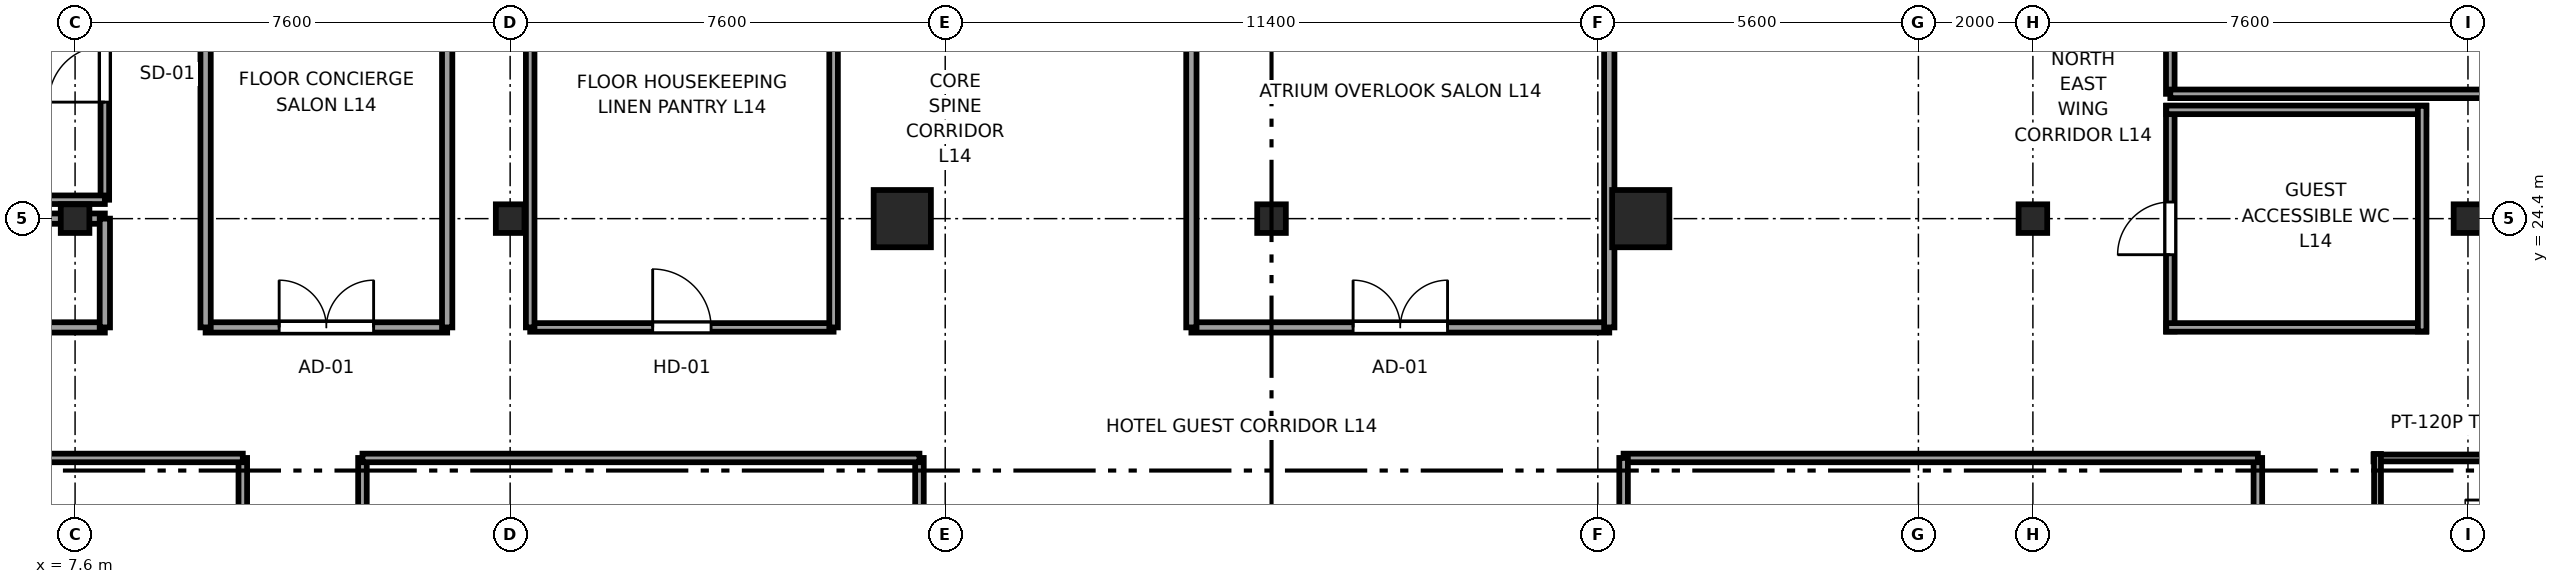
"""IFC4 building model, lengths in metres.
Left out: names, types, materials, properties, quantities, classifications, styles, units other than length and angle.
Written with IfcOpenShell. Run it as: python <this file> out.ifc"""

import sys

from ifc_helpers import new_model, si_unit, direction, frame, frame_2d, origin, origin_2d, place, context, subcontext, project, spatial, rectangle, i_section, extrude, source, transform, mapped, element, fill, save


model = new_model("IFC4")
c1 = context("Model", 3, precision=1e-05, world=origin(), true_north=direction((0.0, 1.0)))
c2 = subcontext(c1, "Body", "Model", "MODEL_VIEW")
j1 = project(units=[si_unit("LENGTHUNIT", "METRE"), si_unit("PLANEANGLEUNIT", "RADIAN")], contexts=[c1])
p1 = place(None, origin())
s1 = spatial("IfcSite", under=j1, at=p1, CompositionType="ELEMENT")
p2 = place(p1, origin())
s2 = spatial("IfcBuilding", under=s1, at=p2, CompositionType="ELEMENT")
p3 = place(p2, frame((0.0, 0.0, 60.4)))
s3 = spatial("IfcBuildingStorey", under=s2, at=p3, CompositionType="ELEMENT", Elevation=60.4)
m1 = source(origin(), c2, "Body", "SweptSolid", [
    extrude(i_section(OverallWidth=0.5, OverallDepth=0.5, WebThickness=0.028, FlangeThickness=0.045, at=origin_2d()), origin(), (0.0, 0.0, 1.0), 3.55),
])
for number, where, z_axis, x_axis in (
    (1, (7.6, 24.4, 0.0), (0.0, 0.0, 1.0), (1.0, 0.0, 0.0)),
    (2, (15.2, 24.4, 0.0), (0.0, 0.0, 1.0), (1.0, 0.0, 0.0)),
):
    element("IfcColumn", number, at=place(p3, frame(where, z_axis=z_axis, x_axis=x_axis)), inside=s3, PredefinedType="COLUMN", context=c2, shape_type="MappedRepresentation", body=[
        mapped(m1, transform((0.0, 0.0, 0.0), x_axis=(1.0, 0.0, 0.0), y_axis=(0.0, 1.0, 0.0), z_axis=(0.0, 0.0, 1.0), scale=1.0)),
    ])
m2 = source(origin(), c2, "Body", "SweptSolid", [
    extrude(rectangle(XDim=1.0, YDim=1.0, at=origin_2d()), origin(), (0.0, 0.0, 1.0), 3.55),
])
for number, where, z_axis, x_axis in (
    (3, (22.05, 24.4, 0.0), (0.0, 0.0, 1.0), (1.0, 0.0, 0.0)),
    (4, (34.95, 24.4, 0.0), (0.0, 0.0, 1.0), (1.0, 0.0, 0.0)),
):
    element("IfcColumn", number, at=place(p3, frame(where, z_axis=z_axis, x_axis=x_axis)), inside=s3, PredefinedType="COLUMN", context=c2, shape_type="MappedRepresentation", body=[
        mapped(m2, transform((0.0, 0.0, 0.0), x_axis=(1.0, 0.0, 0.0), y_axis=(0.0, 1.0, 0.0), z_axis=(0.0, 0.0, 1.0), scale=1.0)),
    ])
for number, where, z_axis, x_axis in (
    (5, (41.8, 24.4, 0.0), (0.0, 0.0, 1.0), (1.0, 0.0, 0.0)),
    (6, (49.4, 24.4, 0.0), (0.0, 0.0, 1.0), (1.0, 0.0, 0.0)),
    (7, (28.5, 24.4, 0.0), (0.0, 0.0, 1.0), (1.0, 0.0, 0.0)),
):
    element("IfcColumn", number, at=place(p3, frame(where, z_axis=z_axis, x_axis=x_axis)), inside=s3, PredefinedType="COLUMN", context=c2, shape_type="MappedRepresentation", body=[
        mapped(m1, transform((0.0, 0.0, 0.0), x_axis=(1.0, 0.0, 0.0), y_axis=(0.0, 1.0, 0.0), z_axis=(0.0, 0.0, 1.0), scale=1.0)),
    ])
p4 = place(p3, frame((47.75, 20.22, 0.0), z_axis=(0.0, 0.0, 1.0), x_axis=(1.0, 0.0, 0.0)))
e8 = element("IfcWall", 8, at=p4, inside=s3, PredefinedType="PLUMBINGWALL", context=c2, shape_type="SweptSolid", body=[
    extrude(rectangle(XDim=2.59, YDim=0.12, at=frame_2d((1.295, 0.0))), origin(), (0.0, 0.0, 1.0), 3.37),
])
p5 = place(p3, frame((47.82, 17.9, 0.0), z_axis=(0.0, 0.0, 1.0), x_axis=(0.0, 1.0, 0.0)))
e9 = element("IfcWall", 9, at=p5, inside=s3, PredefinedType="PLUMBINGWALL", context=c2, shape_type="SweptSolid", body=[
    extrude(rectangle(XDim=2.39, YDim=0.12, at=frame_2d((1.195, 0.0))), origin(), (0.0, 0.0, 1.0), 3.37),
])
p6 = place(p3, frame((10.53, 17.41, 0.0), z_axis=(0.0, 0.0, 1.0), x_axis=(0.0, 1.0, 0.0)))
e10 = element("IfcWall", 10, at=p6, inside=s3, PredefinedType="PARTITIONING", context=c2, shape_type="SweptSolid", body=[
    extrude(rectangle(XDim=2.81, YDim=0.15, at=frame_2d((1.405, 0.0))), origin(), (0.0, 0.0, 1.0), 3.37),
])
p7 = place(p6, frame((0.895, 0.0, 0.0)))
e11 = element("IfcOpeningElement", 11, at=p7, cuts=e10, PredefinedType="OPENING", context=c2, shape_type="SweptSolid", body=[
    extrude(rectangle(XDim=0.98, YDim=2.12, at=frame_2d((0.49, 1.06))), frame((0.0, 0.085, 0.0), z_axis=(0.0, -1.0, 0.0), x_axis=(1.0, 0.0, 0.0)), (0.0, 0.0, 1.0), 0.17),
])
p8 = place(p3, frame((0.405, 20.22, 0.0), z_axis=(0.0, 0.0, 1.0), x_axis=(1.0, 0.0, 0.0)))
e12 = element("IfcWall", 12, at=p8, inside=s3, PredefinedType="PARTITIONING", context=c2, shape_type="SweptSolid", body=[
    extrude(rectangle(XDim=10.125, YDim=0.15, at=frame_2d((5.062, 0.0))), origin(), (0.0, 0.0, 1.0), 3.37),
])
p9 = place(p3, frame((12.62, 12.21, 0.0), z_axis=(0.0, 0.0, 1.0), x_axis=(0.0, 1.0, 0.0)))
e13 = element("IfcWall", 13, at=p9, inside=s3, PredefinedType="PARTITIONING", context=c2, shape_type="SweptSolid", body=[
    extrude(rectangle(XDim=8.01, YDim=0.15, at=frame_2d((4.005, 0.0))), origin(), (0.0, 0.0, 1.0), 3.37),
])
p10 = place(p9, frame((3.495, 0.0, 0.0)))
e14 = element("IfcOpeningElement", 14, at=p10, cuts=e13, PredefinedType="OPENING", context=c2, shape_type="SweptSolid", body=[
    extrude(rectangle(XDim=0.98, YDim=2.12, at=frame_2d((0.49, 1.06))), frame((0.0, 0.085, 0.0), z_axis=(0.0, -1.0, 0.0), x_axis=(1.0, 0.0, 0.0)), (0.0, 0.0, 1.0), 0.17),
])
p11 = place(p3, frame((22.35, 9.88, 0.0), z_axis=(0.0, 0.0, 1.0), x_axis=(0.0, 1.0, 0.0)))
e15 = element("IfcWall", 15, at=p11, inside=s3, PredefinedType="PARTITIONING", context=c2, shape_type="SweptSolid", body=[
    extrude(rectangle(XDim=10.34, YDim=0.15, at=frame_2d((5.17, 0.0))), origin(), (0.0, 0.0, 1.0), 3.37),
])
p12 = place(p3, frame((12.62, 20.22, 0.0), z_axis=(0.0, 0.0, 1.0), x_axis=(1.0, 0.0, 0.0)))
e16 = element("IfcWall", 16, at=p12, inside=s3, PredefinedType="PARTITIONING", context=c2, shape_type="SweptSolid", body=[
    extrude(rectangle(XDim=9.73, YDim=0.15, at=frame_2d((4.865, 0.0))), origin(), (0.0, 0.0, 1.0), 2.954),
])
p13 = place(p3, frame((45.73, 12.61, 0.0), z_axis=(0.0, 0.0, 1.0), x_axis=(0.0, 1.0, 0.0)))
e17 = element("IfcWall", 17, at=p13, inside=s3, PredefinedType="PARTITIONING", context=c2, shape_type="SweptSolid", body=[
    extrude(rectangle(XDim=7.61, YDim=0.15, at=frame_2d((3.805, 0.0))), origin(), (0.0, 0.0, 1.0), 2.954),
])
p14 = place(p13, frame((3.295, 0.0, 0.0)))
e18 = element("IfcOpeningElement", 18, at=p14, cuts=e17, PredefinedType="OPENING", context=c2, shape_type="SweptSolid", body=[
    extrude(rectangle(XDim=0.98, YDim=2.12, at=frame_2d((0.49, 1.06))), frame((0.0, 0.085, 0.0), z_axis=(0.0, -1.0, 0.0), x_axis=(1.0, 0.0, 0.0)), (0.0, 0.0, 1.0), 0.17),
])
p15 = place(p3, frame((34.65, 20.22, 0.0), z_axis=(0.0, 0.0, 1.0), x_axis=(1.0, 0.0, 0.0)))
e19 = element("IfcWall", 19, at=p15, inside=s3, PredefinedType="PARTITIONING", context=c2, shape_type="SweptSolid", body=[
    extrude(rectangle(XDim=11.08, YDim=0.15, at=frame_2d((5.54, 0.0))), origin(), (0.0, 0.0, 1.0), 2.954),
])
p16 = place(p3, frame((34.65, 10.28, 0.0), z_axis=(0.0, 0.0, 1.0), x_axis=(0.0, 1.0, 0.0)))
e20 = element("IfcWall", 20, at=p16, inside=s3, PredefinedType="PARTITIONING", context=c2, shape_type="SweptSolid", body=[
    extrude(rectangle(XDim=9.94, YDim=0.15, at=frame_2d((4.97, 0.0))), origin(), (0.0, 0.0, 1.0), 3.37),
])
p17 = place(p3, frame((0.405, 22.5, 0.0), z_axis=(0.0, 0.0, 1.0), x_axis=(1.0, 0.0, 0.0)))
e21 = element("IfcWall", 21, at=p17, inside=s3, PredefinedType="PARTITIONING", context=c2, shape_type="SweptSolid", body=[
    extrude(rectangle(XDim=7.715, YDim=0.18, at=frame_2d((3.857, 0.0))), origin(), (0.0, 0.0, 1.0), 3.37),
])
p18 = place(p17, frame((3.032, 0.0, 0.0)))
e22 = element("IfcOpeningElement", 22, at=p18, cuts=e21, PredefinedType="OPENING", context=c2, shape_type="SweptSolid", body=[
    extrude(rectangle(XDim=1.65, YDim=2.15, at=frame_2d((0.825, 1.075))), frame((0.0, 0.1, 0.0), z_axis=(0.0, -1.0, 0.0), x_axis=(1.0, 0.0, 0.0)), (0.0, 0.0, 1.0), 0.2),
])
p19 = place(p3, frame((0.405, 24.4, 0.0), z_axis=(0.0, 0.0, 1.0), x_axis=(1.0, 0.0, 0.0)))
e23 = element("IfcWall", 23, at=p19, inside=s3, PredefinedType="PARTITIONING", context=c2, shape_type="SweptSolid", body=[
    extrude(rectangle(XDim=7.715, YDim=0.18, at=frame_2d((3.857, 0.0))), origin(), (0.0, 0.0, 1.0), 2.748),
])
p20 = place(p3, frame((8.12, 22.5, 0.0), z_axis=(0.0, 0.0, 1.0), x_axis=(0.0, 1.0, 0.0)))
e24 = element("IfcWall", 24, at=p20, inside=s3, PredefinedType="PARTITIONING", context=c2, shape_type="SweptSolid", body=[
    extrude(rectangle(XDim=1.9, YDim=0.18, at=frame_2d((0.95, 0.0))), origin(), (0.0, 0.0, 1.0), 3.37),
])
p21 = place(p3, frame((8.12, 24.73, 0.0), z_axis=(0.0, 0.0, 1.0), x_axis=(0.0, 1.0, 0.0)))
e25 = element("IfcWall", 25, at=p21, inside=s3, PredefinedType="PARTITIONING", context=c2, shape_type="SweptSolid", body=[
    extrude(rectangle(XDim=4.39, YDim=0.15, at=frame_2d((2.195, 0.0))), origin(), (0.0, 0.0, 1.0), 3.37),
])
p22 = place(p21, frame((1.705, 0.0, 0.0)))
e26 = element("IfcOpeningElement", 26, at=p22, cuts=e25, PredefinedType="OPENING", context=c2, shape_type="SweptSolid", body=[
    extrude(rectangle(XDim=0.98, YDim=2.12, at=frame_2d((0.49, 1.06))), frame((0.0, 0.085, 0.0), z_axis=(0.0, -1.0, 0.0), x_axis=(1.0, 0.0, 0.0)), (0.0, 0.0, 1.0), 0.17),
])
p23 = place(p3, frame((0.405, 24.73, 0.0), z_axis=(0.0, 0.0, 1.0), x_axis=(1.0, 0.0, 0.0)))
e27 = element("IfcWall", 27, at=p23, inside=s3, PredefinedType="PARTITIONING", context=c2, shape_type="SweptSolid", body=[
    extrude(rectangle(XDim=7.715, YDim=0.15, at=frame_2d((3.857, 0.0))), origin(), (0.0, 0.0, 1.0), 3.37),
])
p24 = place(p3, frame((44.2, 22.43, 0.0), z_axis=(0.0, 0.0, 1.0), x_axis=(0.0, 1.0, 0.0)))
e28 = element("IfcWall", 28, at=p24, inside=s3, PredefinedType="PARTITIONING", context=c2, shape_type="SweptSolid", body=[
    extrude(rectangle(XDim=3.94, YDim=0.15, at=frame_2d((1.97, 0.0))), origin(), (0.0, 0.0, 1.0), 3.37),
])
p25 = place(p24, frame((1.34, 0.0, 0.0)))
e29 = element("IfcOpeningElement", 29, at=p25, cuts=e28, PredefinedType="OPENING", context=c2, shape_type="SweptSolid", body=[
    extrude(rectangle(XDim=0.92, YDim=2.01, at=frame_2d((0.46, 1.005))), frame((0.0, 0.085, 0.0), z_axis=(0.0, -1.0, 0.0), x_axis=(1.0, 0.0, 0.0)), (0.0, 0.0, 1.0), 0.17),
])
for number, where, z_axis, x_axis in (
    (30, (44.13, 22.5, 0.0), (0.0, 0.0, 1.0), (1.0, 0.0, 0.0)),
    (31, (44.13, 26.3, 0.0), (0.0, 0.0, 1.0), (1.0, 0.0, 0.0)),
):
    element("IfcWall", number, at=place(p3, frame(where, z_axis=z_axis, x_axis=x_axis)), inside=s3, PredefinedType="PARTITIONING", context=c2, shape_type="SweptSolid", body=[
        extrude(rectangle(XDim=4.54, YDim=0.15, at=frame_2d((2.27, 0.0))), origin(), (0.0, 0.0, 1.0), 3.37),
    ])
p26 = place(p3, frame((48.6, 22.43, 0.0), z_axis=(0.0, 0.0, 1.0), x_axis=(0.0, 1.0, 0.0)))
e32 = element("IfcWall", 32, at=p26, inside=s3, PredefinedType="PARTITIONING", context=c2, shape_type="SweptSolid", body=[
    extrude(rectangle(XDim=3.94, YDim=0.15, at=frame_2d((1.97, 0.0))), origin(), (0.0, 0.0, 1.0), 3.37),
])
p27 = place(p3, frame((44.2, 26.58, 0.0), z_axis=(0.0, 0.0, 1.0), x_axis=(0.0, 1.0, 0.0)))
e33 = element("IfcWall", 33, at=p27, inside=s3, PredefinedType="PARTITIONING", context=c2, shape_type="SweptSolid", body=[
    extrude(rectangle(XDim=4.58, YDim=0.15, at=frame_2d((2.29, 0.0))), origin(), (0.0, 0.0, 1.0), 3.37),
])
p28 = place(p27, frame((1.745, 0.0, 0.0)))
e34 = element("IfcOpeningElement", 34, at=p28, cuts=e33, PredefinedType="OPENING", context=c2, shape_type="SweptSolid", body=[
    extrude(rectangle(XDim=0.98, YDim=2.12, at=frame_2d((0.49, 1.06))), frame((0.0, 0.085, 0.0), z_axis=(0.0, -1.0, 0.0), x_axis=(1.0, 0.0, 0.0)), (0.0, 0.0, 1.0), 0.17),
])
p29 = place(p3, frame((44.2, 26.58, 0.0), z_axis=(0.0, 0.0, 1.0), x_axis=(1.0, 0.0, 0.0)))
e35 = element("IfcWall", 35, at=p29, inside=s3, PredefinedType="PARTITIONING", context=c2, shape_type="SweptSolid", body=[
    extrude(rectangle(XDim=10.03, YDim=0.15, at=frame_2d((5.015, 0.0))), origin(), (0.0, 0.0, 1.0), 3.37),
])
p30 = place(p3, frame((9.88, 22.5, 0.0), z_axis=(0.0, 0.0, 1.0), x_axis=(1.0, 0.0, 0.0)))
e36 = element("IfcWall", 36, at=p30, inside=s3, PredefinedType="PARTITIONING", context=c2, shape_type="SweptSolid", body=[
    extrude(rectangle(XDim=4.22, YDim=0.18, at=frame_2d((2.11, 0.0))), origin(), (0.0, 0.0, 1.0), 3.37),
])
p31 = place(p30, frame((1.285, 0.0, 0.0)))
e37 = element("IfcOpeningElement", 37, at=p31, cuts=e36, PredefinedType="OPENING", context=c2, shape_type="SweptSolid", body=[
    extrude(rectangle(XDim=1.65, YDim=2.15, at=frame_2d((0.825, 1.075))), frame((0.0, 0.1, 0.0), z_axis=(0.0, -1.0, 0.0), x_axis=(1.0, 0.0, 0.0)), (0.0, 0.0, 1.0), 0.2),
])
for number, where, z_axis, x_axis in (
    (38, (9.88, 22.5, 0.0), (0.0, 0.0, 1.0), (0.0, 1.0, 0.0)),
    (39, (14.1, 22.5, 0.0), (0.0, 0.0, 1.0), (0.0, 1.0, 0.0)),
):
    element("IfcWall", number, at=place(p3, frame(where, z_axis=z_axis, x_axis=x_axis)), inside=s3, PredefinedType="PARTITIONING", context=c2, shape_type="SweptSolid", body=[
        extrude(rectangle(XDim=7.25, YDim=0.18, at=frame_2d((3.625, 0.0))), origin(), (0.0, 0.0, 1.0), 3.37),
    ])
p32 = place(p3, frame((27.1, 22.5, 0.0), z_axis=(0.0, 0.0, 1.0), x_axis=(1.0, 0.0, 0.0)))
e40 = element("IfcWall", 40, at=p32, inside=s3, PredefinedType="PARTITIONING", context=c2, shape_type="SweptSolid", body=[
    extrude(rectangle(XDim=7.3, YDim=0.18, at=frame_2d((3.65, 0.0))), origin(), (0.0, 0.0, 1.0), 3.37),
])
p33 = place(p32, frame((2.825, 0.0, 0.0)))
e41 = element("IfcOpeningElement", 41, at=p33, cuts=e40, PredefinedType="OPENING", context=c2, shape_type="SweptSolid", body=[
    extrude(rectangle(XDim=1.65, YDim=2.15, at=frame_2d((0.825, 1.075))), frame((0.0, 0.1, 0.0), z_axis=(0.0, -1.0, 0.0), x_axis=(1.0, 0.0, 0.0)), (0.0, 0.0, 1.0), 0.2),
])
for number, where, z_axis, x_axis in (
    (42, (27.1, 22.5, 0.0), (0.0, 0.0, 1.0), (0.0, 1.0, 0.0)),
    (43, (34.4, 22.5, 0.0), (0.0, 0.0, 1.0), (0.0, 1.0, 0.0)),
):
    element("IfcWall", number, at=place(p3, frame(where, z_axis=z_axis, x_axis=x_axis)), inside=s3, PredefinedType="PARTITIONING", context=c2, shape_type="SweptSolid", body=[
        extrude(rectangle(XDim=7.3, YDim=0.18, at=frame_2d((3.65, 0.0))), origin(), (0.0, 0.0, 1.0), 3.37),
    ])
p34 = place(p3, frame((15.55, 22.5, 0.0), z_axis=(0.0, 0.0, 1.0), x_axis=(1.0, 0.0, 0.0)))
e44 = element("IfcWall", 44, at=p34, inside=s3, PredefinedType="PARTITIONING", context=c2, shape_type="SweptSolid", body=[
    extrude(rectangle(XDim=5.3, YDim=0.15, at=frame_2d((2.65, 0.0))), origin(), (0.0, 0.0, 1.0), 3.37),
])
p35 = place(p34, frame((2.14, 0.0, 0.0)))
e45 = element("IfcOpeningElement", 45, at=p35, cuts=e44, PredefinedType="OPENING", context=c2, shape_type="SweptSolid", body=[
    extrude(rectangle(XDim=1.02, YDim=2.03, at=frame_2d((0.51, 1.015))), frame((0.0, 0.085, 0.0), z_axis=(0.0, -1.0, 0.0), x_axis=(1.0, 0.0, 0.0)), (0.0, 0.0, 1.0), 0.17),
])
for number, where, z_axis, x_axis in (
    (46, (15.55, 22.5, 0.0), (0.0, 0.0, 1.0), (0.0, 1.0, 0.0)),
    (47, (20.85, 22.5, 0.0), (0.0, 0.0, 1.0), (0.0, 1.0, 0.0)),
):
    element("IfcWall", number, at=place(p3, frame(where, z_axis=z_axis, x_axis=x_axis)), inside=s3, PredefinedType="PARTITIONING", context=c2, shape_type="SweptSolid", body=[
        extrude(rectangle(XDim=7.3, YDim=0.15, at=frame_2d((3.65, 0.0))), origin(), (0.0, 0.0, 1.0), 3.37),
    ])
m3 = source(origin(), c2, "Body", "SweptSolid", [
    extrude(rectangle(XDim=0.98, YDim=2.12, at=frame_2d((0.49, 1.06))), frame((0.0, 0.025, 0.0), z_axis=(0.0, -1.0, 0.0), x_axis=(1.0, 0.0, 0.0)), (0.0, 0.0, 1.0), 0.05),
])
p36 = place(p22, origin())
e48 = element("IfcDoor", 48, at=p36, inside=s3, OperationType="SINGLE_SWING_LEFT", PredefinedType="DOOR", context=c2, shape_type="MappedRepresentation", body=[
    mapped(m3, transform((0.0, 0.0, 0.0), x_axis=(1.0, 0.0, 0.0), y_axis=(0.0, 1.0, 0.0), z_axis=(0.0, 0.0, 1.0), scale=1.0)),
])
fill(e26, e48)
m4 = source(origin(), c2, "Body", "SweptSolid", [
    extrude(rectangle(XDim=0.92, YDim=2.01, at=frame_2d((0.46, 1.005))), frame((0.0, 0.025, 0.0), z_axis=(0.0, -1.0, 0.0), x_axis=(1.0, 0.0, 0.0)), (0.0, 0.0, 1.0), 0.05),
])
p37 = place(p25, origin())
e49 = element("IfcDoor", 49, at=p37, inside=s3, OperationType="SINGLE_SWING_LEFT", PredefinedType="DOOR", context=c2, shape_type="MappedRepresentation", body=[
    mapped(m4, transform((0.0, 0.0, 0.0), x_axis=(1.0, 0.0, 0.0), y_axis=(0.0, 1.0, 0.0), z_axis=(0.0, 0.0, 1.0), scale=1.0)),
])
fill(e29, e49)
m5 = source(origin(), c2, "Body", "SweptSolid", [
    extrude(rectangle(XDim=1.65, YDim=2.15, at=frame_2d((0.825, 1.075))), frame((0.0, 0.025, 0.0), z_axis=(0.0, -1.0, 0.0), x_axis=(1.0, 0.0, 0.0)), (0.0, 0.0, 1.0), 0.05),
])
p38 = place(p31, origin())
e50 = element("IfcDoor", 50, at=p38, inside=s3, OperationType="DOUBLE_DOOR_SINGLE_SWING", PredefinedType="DOOR", context=c2, shape_type="MappedRepresentation", body=[
    mapped(m5, transform((0.0, 0.0, 0.0), x_axis=(1.0, 0.0, 0.0), y_axis=(0.0, 1.0, 0.0), z_axis=(0.0, 0.0, 1.0), scale=1.0)),
])
fill(e37, e50)
p39 = place(p33, origin())
e51 = element("IfcDoor", 51, at=p39, inside=s3, OperationType="DOUBLE_DOOR_SINGLE_SWING", PredefinedType="DOOR", context=c2, shape_type="MappedRepresentation", body=[
    mapped(m5, transform((0.0, 0.0, 0.0), x_axis=(1.0, 0.0, 0.0), y_axis=(0.0, 1.0, 0.0), z_axis=(0.0, 0.0, 1.0), scale=1.0)),
])
fill(e41, e51)
m6 = source(origin(), c2, "Body", "SweptSolid", [
    extrude(rectangle(XDim=1.02, YDim=2.03, at=frame_2d((0.51, 1.015))), frame((0.0, 0.025, 0.0), z_axis=(0.0, -1.0, 0.0), x_axis=(1.0, 0.0, 0.0)), (0.0, 0.0, 1.0), 0.05),
])
p40 = place(p35, origin())
e52 = element("IfcDoor", 52, at=p40, inside=s3, OperationType="SINGLE_SWING_LEFT", PredefinedType="DOOR", context=c2, shape_type="MappedRepresentation", body=[
    mapped(m6, transform((0.0, 0.0, 0.0), x_axis=(1.0, 0.0, 0.0), y_axis=(0.0, 1.0, 0.0), z_axis=(0.0, 0.0, 1.0), scale=1.0)),
])
fill(e45, e52)
save(model, sys.argv[1])
